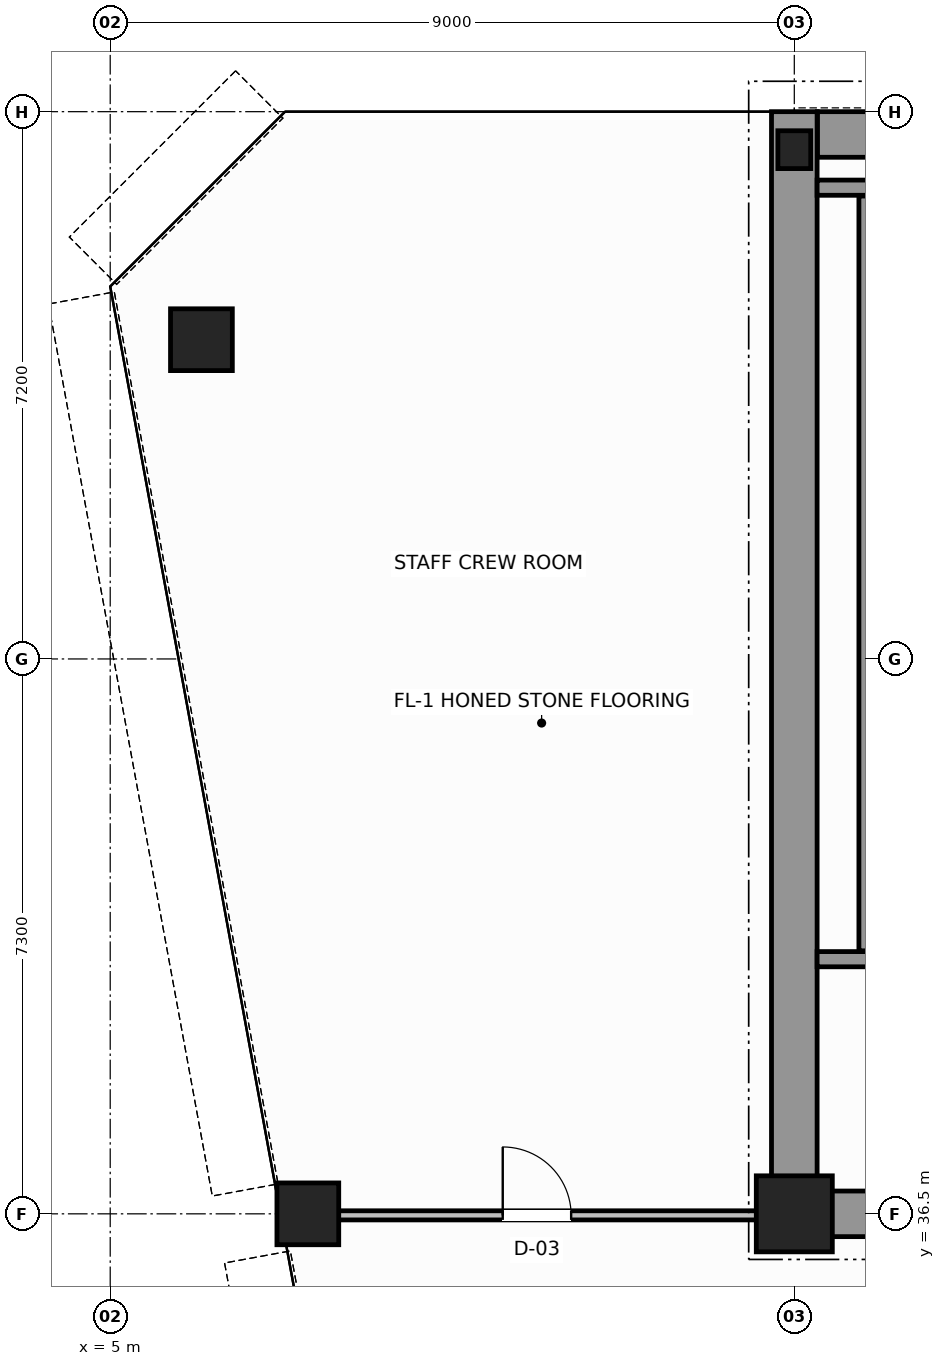
"""IFC4 building model, lengths in metres.
Left out: names, types, materials, properties, quantities, classifications, styles, units other than length and angle.
Written with IfcOpenShell. Run it as: python <this file> out.ifc"""

import sys

from ifc_helpers import new_model, si_unit, direction, frame, frame_2d, origin, origin_2d, place, context, subcontext, project, spatial, rectangle, hollow_circle, i_section, extrude, source, transform, mapped, element, fill, save


model = new_model("IFC4")
c1 = context("Model", 3, precision=1e-05, world=origin(), true_north=direction((0.0, 1.0)))
c2 = subcontext(c1, "Body", "Model", "MODEL_VIEW")
j1 = project(units=[si_unit("LENGTHUNIT", "METRE"), si_unit("PLANEANGLEUNIT", "RADIAN")], contexts=[c1])
p1 = place(None, origin())
s1 = spatial("IfcSite", under=j1, at=p1, CompositionType="ELEMENT")
p2 = place(p1, origin())
s2 = spatial("IfcBuilding", under=s1, at=p2, CompositionType="ELEMENT")
p3 = place(p2, frame((0.0, 0.0, 203.2)))
s3 = spatial("IfcBuildingStorey", under=s2, at=p3, CompositionType="ELEMENT", Elevation=203.2)
m1 = source(origin(), c2, "Body", "SweptSolid", [
    extrude(rectangle(XDim=1.0, YDim=1.0, at=origin_2d()), origin(), (0.0, 0.0, 1.0), 3.8),
])
p4 = place(p3, frame((14.0, 36.5, 0.0), z_axis=(0.0, 0.0, 1.0), x_axis=(1.0, 0.0, 0.0)))
e1 = element("IfcColumn", 1, at=p4, inside=s3, PredefinedType="COLUMN", context=c2, shape_type="MappedRepresentation", body=[
    mapped(m1, transform((0.0, 0.0, 0.0), scale=1.0)),
])
m2 = source(origin(), c2, "Body", "SweptSolid", [
    extrude(i_section(OverallWidth=0.432, OverallDepth=0.498, WebThickness=0.055, FlangeThickness=0.068, FilletRadius=0.015, at=origin_2d()), origin(), (0.0, 0.0, 1.0), 3.8),
])
p5 = place(p3, frame((14.0, 50.5, 0.0), z_axis=(0.0, 0.0, 1.0), x_axis=(1.0, 0.0, 0.0)))
e2 = element("IfcColumn", 2, at=p5, inside=s3, PredefinedType="COLUMN", context=c2, shape_type="MappedRepresentation", body=[
    mapped(m2, transform((0.0, 0.0, 0.0), scale=1.0)),
])
m3 = source(origin(), c2, "Body", "SweptSolid", [
    extrude(hollow_circle(Radius=0.406, WallThickness=0.04, at=origin_2d()), origin(), (0.0, 0.0, 1.0), 3.8),
])
for number, where, z_axis, x_axis in (
    (3, (6.2, 48.0, 0.0), (0.0, 0.0, 1.0), (1.0, 0.0, 0.0)),
    (4, (7.6, 36.5, 0.0), (0.0, 0.0, 1.0), (1.0, 0.0, 0.0)),
):
    element("IfcColumn", number, at=place(p3, frame(where, z_axis=z_axis, x_axis=x_axis)), inside=s3, PredefinedType="COLUMN", context=c2, shape_type="MappedRepresentation", body=[
        mapped(m3, transform((0.0, 0.0, 0.0), scale=1.0)),
    ])
p6 = place(p3, frame((14.304, 50.7, 0.0), z_axis=(0.0, 0.0, 1.0), x_axis=(1.0, 0.0, 0.0)))
e5 = element("IfcWall", 5, at=p6, inside=s3, PredefinedType="SHEAR", context=c2, shape_type="SweptSolid", body=[
    extrude(rectangle(XDim=19.694, YDim=0.6, at=frame_2d((9.847, 0.0))), origin(), (0.0, 0.0, 1.0), 3.8),
])
p7 = place(p3, frame((14.0, 36.5, 0.0), z_axis=(0.0, 0.0, 1.0), x_axis=(0.0, 1.0, 0.0)))
e6 = element("IfcWall", 6, at=p7, inside=s3, PredefinedType="SHEAR", context=c2, shape_type="SweptSolid", body=[
    extrude(rectangle(XDim=14.5, YDim=0.6, at=frame_2d((7.25, 0.0))), origin(), (0.0, 0.0, 1.0), 3.8),
])
p8 = place(p3, frame((14.32, 36.5, 0.0), z_axis=(0.0, 0.0, 1.0), x_axis=(1.0, 0.0, 0.0)))
e7 = element("IfcWall", 7, at=p8, inside=s3, PredefinedType="SHEAR", context=c2, shape_type="SweptSolid", body=[
    extrude(rectangle(XDim=3.88, YDim=0.6, at=frame_2d((1.94, 0.0))), origin(), (0.0, 0.0, 1.0), 2.58),
])
p9 = place(p3, frame((14.3, 39.85, 0.0), z_axis=(0.0, 0.0, 1.0), x_axis=(1.0, 0.0, 0.0)))
e8 = element("IfcWall", 8, at=p9, inside=s3, PredefinedType="SOLIDWALL", context=c2, shape_type="SweptSolid", body=[
    extrude(rectangle(XDim=4.3, YDim=0.2, at=frame_2d((2.15, 0.0))), origin(), (0.0, 0.0, 1.0), 3.8),
])
p10 = place(p9, frame((1.875, 0.0, 0.0)))
e9 = element("IfcOpeningElement", 9, at=p10, cuts=e8, PredefinedType="OPENING", context=c2, shape_type="SweptSolid", body=[
    extrude(rectangle(XDim=1.1, YDim=2.15, at=frame_2d((0.55, 1.075))), frame((0.0, 0.11, 0.0), z_axis=(0.0, -1.0, 0.0), x_axis=(1.0, 0.0, 0.0)), (0.0, 0.0, 1.0), 0.22),
])
p11 = place(p3, frame((14.3, 50.0, 0.0), z_axis=(0.0, 0.0, 1.0), x_axis=(1.0, 0.0, 0.0)))
e10 = element("IfcWall", 10, at=p11, inside=s3, PredefinedType="SOLIDWALL", context=c2, shape_type="SweptSolid", body=[
    extrude(rectangle(XDim=4.3, YDim=0.2, at=frame_2d((2.15, 0.0))), origin(), (0.0, 0.0, 1.0), 3.8),
])
p12 = place(p3, frame((14.95, 39.96, 0.0), z_axis=(0.0, 0.0, 1.0), x_axis=(0.0, 1.0, 0.0)))
e11 = element("IfcWall", 11, at=p12, inside=s3, PredefinedType="SOLIDWALL", context=c2, shape_type="SweptSolid", body=[
    extrude(rectangle(XDim=9.93, YDim=0.2, at=frame_2d((4.965, 0.0))), origin(), (0.0, 0.0, 1.0), 3.8),
])
p13 = place(p3, frame((7.289, 36.48, 0.0), z_axis=(0.0, 0.0, 1.0), x_axis=(1.0, 0.0, 0.0)))
e12 = element("IfcWall", 12, at=p13, inside=s3, PredefinedType="PARTITIONING", context=c2, shape_type="SweptSolid", body=[
    extrude(rectangle(XDim=6.651, YDim=0.12, at=frame_2d((3.325, 0.0))), origin(), (0.0, 0.0, 1.0), 2.37),
])
p14 = place(p13, frame((2.875, 0.0, 0.0)))
e13 = element("IfcOpeningElement", 13, at=p14, cuts=e12, PredefinedType="OPENING", context=c2, shape_type="SweptSolid", body=[
    extrude(rectangle(XDim=0.9, YDim=2.15, at=frame_2d((0.45, 1.075))), frame((0.0, 0.07, 0.0), z_axis=(0.0, -1.0, 0.0), x_axis=(1.0, 0.0, 0.0)), (0.0, 0.0, 1.0), 0.14),
])
m4 = source(origin(), c2, "Body", "SweptSolid", [
    extrude(rectangle(XDim=0.9, YDim=2.15, at=frame_2d((0.45, 1.075))), frame((0.0, 0.025, 0.0), z_axis=(0.0, -1.0, 0.0), x_axis=(1.0, 0.0, 0.0)), (0.0, 0.0, 1.0), 0.05),
])
p15 = place(p14, origin())
e14 = element("IfcDoor", 14, at=p15, inside=s3, OperationType="SINGLE_SWING_LEFT", PredefinedType="DOOR", context=c2, shape_type="MappedRepresentation", body=[
    mapped(m4, transform((0.0, 0.0, 0.0), scale=1.0)),
])
fill(e13, e14)
save(model, sys.argv[1])
